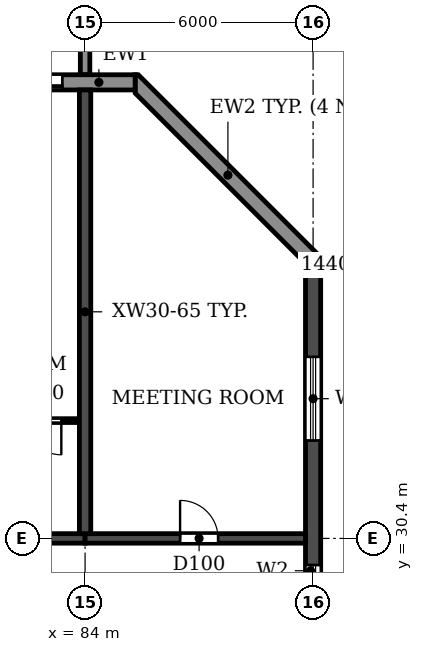
"""IFC4 building model, lengths in metres.
Left out: names, types, materials, properties, quantities, classifications, styles, units other than length and angle.
Written with IfcOpenShell. Run it as: python <this file> out.ifc"""

import sys

from ifc_helpers import new_model, si_unit, direction, frame, frame_2d, origin, place, context, subcontext, project, spatial, polyline, rectangle, outline, extrude, source, transform, mapped, element, fill, save


model = new_model("IFC4")
c1 = context("Model", 3, precision=1e-05, world=origin(), true_north=direction((0.0, 1.0)))
c2 = subcontext(c1, "Body", "Model", "MODEL_VIEW")
j1 = project(units=[si_unit("LENGTHUNIT", "METRE"), si_unit("PLANEANGLEUNIT", "RADIAN")], contexts=[c1])
p1 = place(None, origin())
s1 = spatial("IfcSite", under=j1, at=p1, CompositionType="ELEMENT")
p2 = place(p1, origin())
s2 = spatial("IfcBuilding", under=s1, at=p2, CompositionType="ELEMENT")
p3 = place(p2, frame((0.0, 0.0, 152.1)))
s3 = spatial("IfcBuildingStorey", under=s2, at=p3, CompositionType="ELEMENT", Elevation=152.1)
p4 = place(p3, frame((84.0, 30.525, 0.0), z_axis=(0.0, 0.0, 1.0), x_axis=(0.0, 1.0, 0.0)))
e1 = element("IfcWall", 1, at=p4, inside=s3, PredefinedType="SHEAR", context=c2, shape_type="SweptSolid", body=[
    extrude(rectangle(XDim=11.675, YDim=0.3, at=frame_2d((5.837, 0.0))), origin(), (0.0, 0.0, 1.0), 3.07),
])
p5 = place(p3, frame((90.0, 4.683, 0.0), z_axis=(0.0, 0.0, 1.0), x_axis=(0.0, 1.0, 0.0)))
e2 = element("IfcWall", 2, at=p5, inside=s3, PredefinedType="SHEAR", context=c2, shape_type="SweptSolid", body=[
    extrude(rectangle(XDim=33.034, YDim=0.4, at=frame_2d((16.517, 0.0))), origin(), (0.0, 0.0, 1.0), 3.07),
])
p6 = place(p5, frame((23.817, 0.0, 0.9)))
e3 = element("IfcOpeningElement", 3, at=p6, cuts=e2, PredefinedType="OPENING", context=c2, shape_type="SweptSolid", body=[
    extrude(rectangle(XDim=1.2, YDim=1.5, at=frame_2d((0.6, 0.75))), frame((0.0, 0.21, 0.0), z_axis=(0.0, -1.0, 0.0), x_axis=(1.0, 0.0, 0.0)), (0.0, 0.0, 1.0), 0.42),
])
p7 = place(p5, frame((8.017, 0.0, 0.9)))
e4 = element("IfcOpeningElement", 4, at=p7, cuts=e2, PredefinedType="OPENING", context=c2, shape_type="SweptSolid", body=[
    extrude(rectangle(XDim=1.2, YDim=1.5, at=frame_2d((0.6, 0.75))), frame((0.0, 0.21, 0.0), z_axis=(0.0, -1.0, 0.0), x_axis=(1.0, 0.0, 0.0)), (0.0, 0.0, 1.0), 0.42),
])
p8 = place(p5, frame((28.293, 0.0, 0.6)))
e5 = element("IfcOpeningElement", 5, at=p8, cuts=e2, PredefinedType="OPENING", context=c2, shape_type="SweptSolid", body=[
    extrude(rectangle(XDim=2.2, YDim=1.8, at=frame_2d((1.1, 0.9))), frame((0.0, 0.21, 0.0), z_axis=(0.0, -1.0, 0.0), x_axis=(1.0, 0.0, 0.0)), (0.0, 0.0, 1.0), 0.42),
])
p9 = place(p5, frame((2.541, 0.0, 0.6)))
e6 = element("IfcOpeningElement", 6, at=p9, cuts=e2, PredefinedType="OPENING", context=c2, shape_type="SweptSolid", body=[
    extrude(rectangle(XDim=2.2, YDim=1.8, at=frame_2d((1.1, 0.9))), frame((0.0, 0.21, 0.0), z_axis=(0.0, -1.0, 0.0), x_axis=(1.0, 0.0, 0.0)), (0.0, 0.0, 1.0), 0.42),
])
p10 = place(p5, frame((19.417, 0.0, 0.6)))
e7 = element("IfcOpeningElement", 7, at=p10, cuts=e2, PredefinedType="OPENING", context=c2, shape_type="SweptSolid", body=[
    extrude(rectangle(XDim=2.2, YDim=1.8, at=frame_2d((1.1, 0.9))), frame((0.0, 0.21, 0.0), z_axis=(0.0, -1.0, 0.0), x_axis=(1.0, 0.0, 0.0)), (0.0, 0.0, 1.0), 0.42),
])
p11 = place(p3, frame((78.0, 30.4, 0.0), z_axis=(0.0, 0.0, 1.0), x_axis=(1.0, 0.0, 0.0)))
e8 = element("IfcWall", 8, at=p11, inside=s3, PredefinedType="SHEAR", context=c2, shape_type="SweptSolid", body=[
    extrude(rectangle(XDim=6.0, YDim=0.25, at=frame_2d((3.0, 0.0))), origin(), (0.0, 0.0, 1.0), 2.47),
])
p12 = place(p11, frame((2.45, 0.0, 0.0)))
e9 = element("IfcOpeningElement", 9, at=p12, cuts=e8, PredefinedType="OPENING", context=c2, shape_type="SweptSolid", body=[
    extrude(rectangle(XDim=1.0, YDim=2.1, at=frame_2d((0.5, 1.05))), frame((0.0, 0.135, 0.0), z_axis=(0.0, -1.0, 0.0), x_axis=(1.0, 0.0, 0.0)), (0.0, 0.0, 1.0), 0.27),
])
p13 = place(p3, frame((84.0, 30.4, 0.0), z_axis=(0.0, 0.0, 1.0), x_axis=(1.0, 0.0, 0.0)))
e10 = element("IfcWall", 10, at=p13, inside=s3, PredefinedType="SHEAR", context=c2, shape_type="SweptSolid", body=[
    extrude(rectangle(XDim=5.8, YDim=0.25, at=frame_2d((2.9, 0.0))), origin(), (0.0, 0.0, 1.0), 2.47),
])
p14 = place(p13, frame((2.5, 0.0, 0.0)))
e11 = element("IfcOpeningElement", 11, at=p14, cuts=e10, PredefinedType="OPENING", context=c2, shape_type="SweptSolid", body=[
    extrude(rectangle(XDim=1.0, YDim=2.1, at=frame_2d((0.5, 1.05))), frame((0.0, 0.135, 0.0), z_axis=(0.0, -1.0, 0.0), x_axis=(1.0, 0.0, 0.0)), (0.0, 0.0, 1.0), 0.27),
])
p15 = place(p3, origin())
e12 = element("IfcWall", 12, at=p15, inside=s3, PredefinedType="STANDARD", context=c2, shape_type="SweptSolid", body=[
    extrude(outline(polyline([(90.2, 37.717), (90.2, 37.8), (85.4, 42.6), (85.317, 42.6), (85.317, 42.117), (89.717, 37.717), (90.2, 37.717)])), origin(), (0.0, 0.0, 1.0), 3.07),
])
p16 = place(p3, frame((85.317, 42.4, 0.0), z_axis=(0.0, 0.0, 1.0), x_axis=(-1.0, 0.0, 0.0)))
e13 = element("IfcWall", 13, at=p16, inside=s3, PredefinedType="STANDARD", context=c2, shape_type="SweptSolid", body=[
    extrude(rectangle(XDim=68.634, YDim=0.4, at=frame_2d((34.317, 0.0))), origin(), (0.0, 0.0, 1.0), 3.07),
])
p17 = place(p16, frame((64.917, 0.0, 0.0)))
e14 = element("IfcOpeningElement", 14, at=p17, cuts=e13, PredefinedType="OPENING", context=c2, shape_type="SweptSolid", body=[
    extrude(rectangle(XDim=1.8, YDim=2.4, at=frame_2d((0.9, 1.2))), frame((0.0, 0.21, 0.0), z_axis=(0.0, -1.0, 0.0), x_axis=(1.0, 0.0, 0.0)), (0.0, 0.0, 1.0), 0.42),
])
p18 = place(p16, frame((61.717, 0.0, 0.9)))
e15 = element("IfcOpeningElement", 15, at=p18, cuts=e13, PredefinedType="OPENING", context=c2, shape_type="SweptSolid", body=[
    extrude(rectangle(XDim=2.2, YDim=1.5, at=frame_2d((1.1, 0.75))), frame((0.0, 0.21, 0.0), z_axis=(0.0, -1.0, 0.0), x_axis=(1.0, 0.0, 0.0)), (0.0, 0.0, 1.0), 0.42),
])
p19 = place(p16, frame((58.717, 0.0, 0.9)))
e16 = element("IfcOpeningElement", 16, at=p19, cuts=e13, PredefinedType="OPENING", context=c2, shape_type="SweptSolid", body=[
    extrude(rectangle(XDim=2.2, YDim=1.5, at=frame_2d((1.1, 0.75))), frame((0.0, 0.21, 0.0), z_axis=(0.0, -1.0, 0.0), x_axis=(1.0, 0.0, 0.0)), (0.0, 0.0, 1.0), 0.42),
])
p20 = place(p16, frame((55.917, 0.0, 0.0)))
e17 = element("IfcOpeningElement", 17, at=p20, cuts=e13, PredefinedType="OPENING", context=c2, shape_type="SweptSolid", body=[
    extrude(rectangle(XDim=1.8, YDim=2.4, at=frame_2d((0.9, 1.2))), frame((0.0, 0.21, 0.0), z_axis=(0.0, -1.0, 0.0), x_axis=(1.0, 0.0, 0.0)), (0.0, 0.0, 1.0), 0.42),
])
p21 = place(p16, frame((52.917, 0.0, 0.0)))
e18 = element("IfcOpeningElement", 18, at=p21, cuts=e13, PredefinedType="OPENING", context=c2, shape_type="SweptSolid", body=[
    extrude(rectangle(XDim=1.8, YDim=2.4, at=frame_2d((0.9, 1.2))), frame((0.0, 0.21, 0.0), z_axis=(0.0, -1.0, 0.0), x_axis=(1.0, 0.0, 0.0)), (0.0, 0.0, 1.0), 0.42),
])
p22 = place(p16, frame((49.717, 0.0, 0.9)))
e19 = element("IfcOpeningElement", 19, at=p22, cuts=e13, PredefinedType="OPENING", context=c2, shape_type="SweptSolid", body=[
    extrude(rectangle(XDim=2.2, YDim=1.5, at=frame_2d((1.1, 0.75))), frame((0.0, 0.21, 0.0), z_axis=(0.0, -1.0, 0.0), x_axis=(1.0, 0.0, 0.0)), (0.0, 0.0, 1.0), 0.42),
])
p23 = place(p16, frame((46.717, 0.0, 0.9)))
e20 = element("IfcOpeningElement", 20, at=p23, cuts=e13, PredefinedType="OPENING", context=c2, shape_type="SweptSolid", body=[
    extrude(rectangle(XDim=2.2, YDim=1.5, at=frame_2d((1.1, 0.75))), frame((0.0, 0.21, 0.0), z_axis=(0.0, -1.0, 0.0), x_axis=(1.0, 0.0, 0.0)), (0.0, 0.0, 1.0), 0.42),
])
p24 = place(p16, frame((43.717, 0.0, 0.9)))
e21 = element("IfcOpeningElement", 21, at=p24, cuts=e13, PredefinedType="OPENING", context=c2, shape_type="SweptSolid", body=[
    extrude(rectangle(XDim=2.2, YDim=1.5, at=frame_2d((1.1, 0.75))), frame((0.0, 0.21, 0.0), z_axis=(0.0, -1.0, 0.0), x_axis=(1.0, 0.0, 0.0)), (0.0, 0.0, 1.0), 0.42),
])
p25 = place(p16, frame((40.917, 0.0, 0.0)))
e22 = element("IfcOpeningElement", 22, at=p25, cuts=e13, PredefinedType="OPENING", context=c2, shape_type="SweptSolid", body=[
    extrude(rectangle(XDim=1.8, YDim=2.4, at=frame_2d((0.9, 1.2))), frame((0.0, 0.21, 0.0), z_axis=(0.0, -1.0, 0.0), x_axis=(1.0, 0.0, 0.0)), (0.0, 0.0, 1.0), 0.42),
])
p26 = place(p16, frame((37.717, 0.0, 0.9)))
e23 = element("IfcOpeningElement", 23, at=p26, cuts=e13, PredefinedType="OPENING", context=c2, shape_type="SweptSolid", body=[
    extrude(rectangle(XDim=2.2, YDim=1.5, at=frame_2d((1.1, 0.75))), frame((0.0, 0.21, 0.0), z_axis=(0.0, -1.0, 0.0), x_axis=(1.0, 0.0, 0.0)), (0.0, 0.0, 1.0), 0.42),
])
p27 = place(p16, frame((34.917, 0.0, 0.0)))
e24 = element("IfcOpeningElement", 24, at=p27, cuts=e13, PredefinedType="OPENING", context=c2, shape_type="SweptSolid", body=[
    extrude(rectangle(XDim=1.8, YDim=2.4, at=frame_2d((0.9, 1.2))), frame((0.0, 0.21, 0.0), z_axis=(0.0, -1.0, 0.0), x_axis=(1.0, 0.0, 0.0)), (0.0, 0.0, 1.0), 0.42),
])
p28 = place(p16, frame((31.717, 0.0, 0.9)))
e25 = element("IfcOpeningElement", 25, at=p28, cuts=e13, PredefinedType="OPENING", context=c2, shape_type="SweptSolid", body=[
    extrude(rectangle(XDim=2.2, YDim=1.5, at=frame_2d((1.1, 0.75))), frame((0.0, 0.21, 0.0), z_axis=(0.0, -1.0, 0.0), x_axis=(1.0, 0.0, 0.0)), (0.0, 0.0, 1.0), 0.42),
])
p29 = place(p16, frame((28.717, 0.0, 0.9)))
e26 = element("IfcOpeningElement", 26, at=p29, cuts=e13, PredefinedType="OPENING", context=c2, shape_type="SweptSolid", body=[
    extrude(rectangle(XDim=2.2, YDim=1.5, at=frame_2d((1.1, 0.75))), frame((0.0, 0.21, 0.0), z_axis=(0.0, -1.0, 0.0), x_axis=(1.0, 0.0, 0.0)), (0.0, 0.0, 1.0), 0.42),
])
p30 = place(p16, frame((25.717, 0.0, 0.9)))
e27 = element("IfcOpeningElement", 27, at=p30, cuts=e13, PredefinedType="OPENING", context=c2, shape_type="SweptSolid", body=[
    extrude(rectangle(XDim=2.2, YDim=1.5, at=frame_2d((1.1, 0.75))), frame((0.0, 0.21, 0.0), z_axis=(0.0, -1.0, 0.0), x_axis=(1.0, 0.0, 0.0)), (0.0, 0.0, 1.0), 0.42),
])
p31 = place(p16, frame((22.717, 0.0, 0.9)))
e28 = element("IfcOpeningElement", 28, at=p31, cuts=e13, PredefinedType="OPENING", context=c2, shape_type="SweptSolid", body=[
    extrude(rectangle(XDim=2.2, YDim=1.5, at=frame_2d((1.1, 0.75))), frame((0.0, 0.21, 0.0), z_axis=(0.0, -1.0, 0.0), x_axis=(1.0, 0.0, 0.0)), (0.0, 0.0, 1.0), 0.42),
])
p32 = place(p16, frame((19.917, 0.0, 0.0)))
e29 = element("IfcOpeningElement", 29, at=p32, cuts=e13, PredefinedType="OPENING", context=c2, shape_type="SweptSolid", body=[
    extrude(rectangle(XDim=1.8, YDim=2.4, at=frame_2d((0.9, 1.2))), frame((0.0, 0.21, 0.0), z_axis=(0.0, -1.0, 0.0), x_axis=(1.0, 0.0, 0.0)), (0.0, 0.0, 1.0), 0.42),
])
p33 = place(p16, frame((16.717, 0.0, 0.9)))
e30 = element("IfcOpeningElement", 30, at=p33, cuts=e13, PredefinedType="OPENING", context=c2, shape_type="SweptSolid", body=[
    extrude(rectangle(XDim=2.2, YDim=1.5, at=frame_2d((1.1, 0.75))), frame((0.0, 0.21, 0.0), z_axis=(0.0, -1.0, 0.0), x_axis=(1.0, 0.0, 0.0)), (0.0, 0.0, 1.0), 0.42),
])
p34 = place(p16, frame((13.717, 0.0, 0.9)))
e31 = element("IfcOpeningElement", 31, at=p34, cuts=e13, PredefinedType="OPENING", context=c2, shape_type="SweptSolid", body=[
    extrude(rectangle(XDim=2.2, YDim=1.5, at=frame_2d((1.1, 0.75))), frame((0.0, 0.21, 0.0), z_axis=(0.0, -1.0, 0.0), x_axis=(1.0, 0.0, 0.0)), (0.0, 0.0, 1.0), 0.42),
])
p35 = place(p16, frame((10.917, 0.0, 0.0)))
e32 = element("IfcOpeningElement", 32, at=p35, cuts=e13, PredefinedType="OPENING", context=c2, shape_type="SweptSolid", body=[
    extrude(rectangle(XDim=1.8, YDim=2.4, at=frame_2d((0.9, 1.2))), frame((0.0, 0.21, 0.0), z_axis=(0.0, -1.0, 0.0), x_axis=(1.0, 0.0, 0.0)), (0.0, 0.0, 1.0), 0.42),
])
p36 = place(p16, frame((7.717, 0.0, 0.9)))
e33 = element("IfcOpeningElement", 33, at=p36, cuts=e13, PredefinedType="OPENING", context=c2, shape_type="SweptSolid", body=[
    extrude(rectangle(XDim=2.2, YDim=1.5, at=frame_2d((1.1, 0.75))), frame((0.0, 0.21, 0.0), z_axis=(0.0, -1.0, 0.0), x_axis=(1.0, 0.0, 0.0)), (0.0, 0.0, 1.0), 0.42),
])
p37 = place(p16, frame((4.717, 0.0, 0.9)))
e34 = element("IfcOpeningElement", 34, at=p37, cuts=e13, PredefinedType="OPENING", context=c2, shape_type="SweptSolid", body=[
    extrude(rectangle(XDim=2.2, YDim=1.5, at=frame_2d((1.1, 0.75))), frame((0.0, 0.21, 0.0), z_axis=(0.0, -1.0, 0.0), x_axis=(1.0, 0.0, 0.0)), (0.0, 0.0, 1.0), 0.42),
])
p38 = place(p16, frame((1.917, 0.0, 0.0)))
e35 = element("IfcOpeningElement", 35, at=p38, cuts=e13, PredefinedType="OPENING", context=c2, shape_type="SweptSolid", body=[
    extrude(rectangle(XDim=1.8, YDim=2.4, at=frame_2d((0.9, 1.2))), frame((0.0, 0.21, 0.0), z_axis=(0.0, -1.0, 0.0), x_axis=(1.0, 0.0, 0.0)), (0.0, 0.0, 1.0), 0.42),
])
m1 = source(origin(), c2, "Body", "SweptSolid", [
    extrude(outline(polyline([(0.0, 0.0), (0.25, 0.0), (0.25, 3.1), (0.0, 3.1), (0.0, 0.0)])), origin(), (0.0, 0.0, 1.0), 3.1),
])
p39 = place(p3, frame((83.875, 42.6, 0.0)))
e36 = element("IfcWall", 36, at=p39, inside=s3, PredefinedType="STANDARD", context=c2, shape_type="MappedRepresentation", body=[
    mapped(m1, transform((0.0, 0.0, 0.0))),
])
p40 = place(p3, frame((81.8, 33.5, 0.0), z_axis=(0.0, 0.0, 1.0), x_axis=(1.0, 0.0, 0.0)))
e37 = element("IfcWall", 37, at=p40, inside=s3, PredefinedType="PARTITIONING", context=c2, shape_type="SweptSolid", body=[
    extrude(rectangle(XDim=2.04, YDim=0.1, at=frame_2d((1.02, 0.0))), origin(), (0.0, 0.0, 1.0), 3.07),
])
p41 = place(p40, frame((0.675, 0.0, 0.0)))
e38 = element("IfcOpeningElement", 38, at=p41, cuts=e37, PredefinedType="OPENING", context=c2, shape_type="SweptSolid", body=[
    extrude(rectangle(XDim=0.9, YDim=2.1, at=frame_2d((0.45, 1.05))), frame((0.0, 0.06, 0.0), z_axis=(0.0, -1.0, 0.0), x_axis=(1.0, 0.0, 0.0)), (0.0, 0.0, 1.0), 0.12),
])
p42 = place(p6, origin())
e39 = element("IfcWindow", 39, at=p42, inside=s3, PartitioningType="SINGLE_PANEL", PredefinedType="WINDOW", context=c2, shape_type="SweptSolid", body=[
    extrude(rectangle(XDim=1.2, YDim=1.5, at=frame_2d((0.6, 0.75))), frame((0.0, 0.03, 0.0), z_axis=(0.0, -1.0, 0.0), x_axis=(1.0, 0.0, 0.0)), (0.0, 0.0, 1.0), 0.06),
])
fill(e3, e39)
p43 = place(p8, origin())
e40 = element("IfcWindow", 40, at=p43, inside=s3, PartitioningType="DOUBLE_PANEL_HORIZONTAL", PredefinedType="WINDOW", context=c2, shape_type="SweptSolid", body=[
    extrude(rectangle(XDim=2.2, YDim=1.8, at=frame_2d((1.1, 0.9))), frame((0.0, 0.03, 0.0), z_axis=(0.0, -1.0, 0.0), x_axis=(1.0, 0.0, 0.0)), (0.0, 0.0, 1.0), 0.06),
])
fill(e5, e40)
p44 = place(p38, origin())
e41 = element("IfcDoor", 41, at=p44, inside=s3, OperationType="DOUBLE_DOOR_SLIDING", PredefinedType="DOOR", context=c2, shape_type="SweptSolid", body=[
    extrude(rectangle(XDim=1.8, YDim=2.4, at=frame_2d((0.9, 1.2))), frame((0.0, 0.025, 0.0), z_axis=(0.0, -1.0, 0.0), x_axis=(1.0, 0.0, 0.0)), (0.0, 0.0, 1.0), 0.05),
])
fill(e35, e41)
p45 = place(p41, frame((0.9, 0.0, 0.0), z_axis=(0.0, 0.0, 1.0), x_axis=(-1.0, 0.0, 0.0)))
e42 = element("IfcDoor", 42, at=p45, inside=s3, OperationType="SINGLE_SWING_LEFT", PredefinedType="DOOR", context=c2, shape_type="SweptSolid", body=[
    extrude(rectangle(XDim=0.9, YDim=2.1, at=frame_2d((0.45, 1.05))), frame((0.0, 0.025, 0.0), z_axis=(0.0, -1.0, 0.0), x_axis=(1.0, 0.0, 0.0)), (0.0, 0.0, 1.0), 0.05),
])
fill(e38, e42)
p46 = place(p14, origin())
e43 = element("IfcDoor", 43, at=p46, inside=s3, OperationType="SINGLE_SWING_LEFT", PredefinedType="DOOR", context=c2, shape_type="SweptSolid", body=[
    extrude(rectangle(XDim=1.0, YDim=2.1, at=frame_2d((0.5, 1.05))), frame((0.0, 0.025, 0.0), z_axis=(0.0, -1.0, 0.0), x_axis=(1.0, 0.0, 0.0)), (0.0, 0.0, 1.0), 0.05),
])
fill(e11, e43)
save(model, sys.argv[1])
